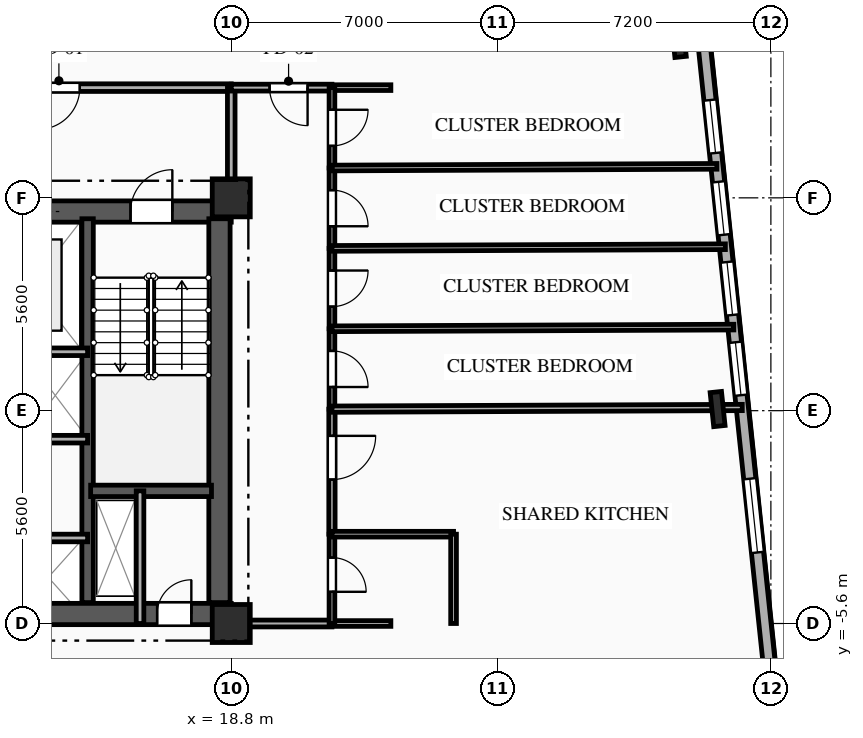
"""IFC4 building model, lengths in metres.
Left out: names, types, materials, properties, quantities, classifications, styles, units other than length and angle.
Written with IfcOpenShell. Run it as: python <this file> out.ifc"""

import sys

from ifc_helpers import new_model, si_unit, direction, frame, frame_2d, origin, origin_2d, place, context, subcontext, project, spatial, rectangle, i_section, extrude, element, fill, save


model = new_model("IFC4")
c1 = context("Model", 3, precision=1e-05, world=origin(), true_north=direction((0.0, 1.0)))
c2 = subcontext(c1, "Body", "Model", "MODEL_VIEW")
j1 = project(units=[si_unit("LENGTHUNIT", "METRE"), si_unit("PLANEANGLEUNIT", "RADIAN")], contexts=[c1])
p1 = place(None, origin())
s1 = spatial("IfcSite", under=j1, at=p1, CompositionType="ELEMENT")
p2 = place(p1, origin())
s2 = spatial("IfcBuilding", under=s1, at=p2, CompositionType="ELEMENT")
p3 = place(p2, frame((0.0, 0.0, 79.0)))
s3 = spatial("IfcBuildingStorey", under=s2, at=p3, CompositionType="ELEMENT", Elevation=79.0)
for number, where, z_axis, x_axis in (
    (1, (18.8, -5.6, 0.0), (0.0, 0.0, 1.0), (1.0, 0.0, 0.0)),
    (2, (18.8, 5.6, 0.0), (0.0, 0.0, 1.0), (1.0, 0.0, 0.0)),
):
    element("IfcColumn", number, at=place(p3, frame(where, z_axis=z_axis, x_axis=x_axis)), inside=s3, PredefinedType="COLUMN", context=c2, shape_type="SweptSolid", body=[
        extrude(rectangle(XDim=1.0, YDim=1.0, at=origin_2d()), origin(), (0.0, 0.0, 1.0), 3.35),
    ])
for number, where, z_axis, x_axis in (
    (3, (31.598, 0.043, 0.0), (0.0, 0.0, 1.0), (0.995, 0.105, 0.0)),
    (4, (30.577, 9.756, 0.0), (0.0, 0.0, 1.0), (0.995, 0.105, 0.0)),
):
    element("IfcColumn", number, at=place(p3, frame(where, z_axis=z_axis, x_axis=x_axis)), inside=s3, PredefinedType="COLUMN", context=c2, shape_type="SweptSolid", body=[
        extrude(i_section(OverallWidth=0.3, OverallDepth=0.9, WebThickness=0.019, FlangeThickness=0.035, FilletRadius=0.03, at=origin_2d()), origin(), (0.0, 0.0, 1.0), 3.35),
    ])
p4 = place(p3, frame((30.135, 20.183, 0.0), z_axis=(0.0, 0.0, 1.0), x_axis=(0.104525716865, -0.994522184023, 0.0)))
e5 = element("IfcWall", 5, at=p4, inside=s3, PredefinedType="SOLIDWALL", context=c2, shape_type="SweptSolid", body=[
    extrude(rectangle(XDim=30.6, YDim=0.32, at=frame_2d((15.3, 0.0))), origin(), (0.0, 0.0, 1.0), 3.045),
])
p5 = place(p4, frame((12.077, 0.0, 0.85)))
e6 = element("IfcOpeningElement", 6, at=p5, cuts=e5, PredefinedType="OPENING", context=c2, shape_type="SweptSolid", body=[
    extrude(rectangle(XDim=1.4, YDim=1.85, at=frame_2d((0.7, 0.925))), frame((0.0, 0.17, 0.0), z_axis=(0.0, -1.0, 0.0), x_axis=(1.0, 0.0, 0.0)), (0.0, 0.0, 1.0), 0.34),
])
p6 = place(p4, frame((14.24, 0.0, 0.85)))
e7 = element("IfcOpeningElement", 7, at=p6, cuts=e5, PredefinedType="OPENING", context=c2, shape_type="SweptSolid", body=[
    extrude(rectangle(XDim=1.4, YDim=1.85, at=frame_2d((0.7, 0.925))), frame((0.0, 0.17, 0.0), z_axis=(0.0, -1.0, 0.0), x_axis=(1.0, 0.0, 0.0)), (0.0, 0.0, 1.0), 0.34),
])
p7 = place(p4, frame((16.362, 0.0, 0.85)))
e8 = element("IfcOpeningElement", 8, at=p7, cuts=e5, PredefinedType="OPENING", context=c2, shape_type="SweptSolid", body=[
    extrude(rectangle(XDim=1.4, YDim=1.85, at=frame_2d((0.7, 0.925))), frame((0.0, 0.17, 0.0), z_axis=(0.0, -1.0, 0.0), x_axis=(1.0, 0.0, 0.0)), (0.0, 0.0, 1.0), 0.34),
])
p8 = place(p4, frame((18.485, 0.0, 0.85)))
e9 = element("IfcOpeningElement", 9, at=p8, cuts=e5, PredefinedType="OPENING", context=c2, shape_type="SweptSolid", body=[
    extrude(rectangle(XDim=1.4, YDim=1.85, at=frame_2d((0.7, 0.925))), frame((0.0, 0.17, 0.0), z_axis=(0.0, -1.0, 0.0), x_axis=(1.0, 0.0, 0.0)), (0.0, 0.0, 1.0), 0.34),
])
p9 = place(p4, frame((22.095, 0.0, 0.85)))
e10 = element("IfcOpeningElement", 10, at=p9, cuts=e5, PredefinedType="OPENING", context=c2, shape_type="SweptSolid", body=[
    extrude(rectangle(XDim=1.95, YDim=1.85, at=frame_2d((0.975, 0.925))), frame((0.0, 0.17, 0.0), z_axis=(0.0, -1.0, 0.0), x_axis=(1.0, 0.0, 0.0)), (0.0, 0.0, 1.0), 0.34),
])
p10 = place(p3, frame((9.2, 5.24, 0.0), z_axis=(0.0, 0.0, 1.0), x_axis=(1.0, 0.0, 0.0)))
e11 = element("IfcWall", 11, at=p10, inside=s3, PredefinedType="SHEAR", context=c2, shape_type="SweptSolid", body=[
    extrude(rectangle(XDim=9.6, YDim=0.56, at=frame_2d((4.8, 0.0))), origin(), (0.0, 0.0, 1.0), 3.045),
])
p11 = place(p10, frame((6.95, 0.0, 0.0)))
e12 = element("IfcOpeningElement", 12, at=p11, cuts=e11, PredefinedType="OPENING", context=c2, shape_type="SweptSolid", body=[
    extrude(rectangle(XDim=1.1, YDim=2.15, at=frame_2d((0.55, 1.075))), frame((0.0, 0.29, 0.0), z_axis=(0.0, -1.0, 0.0), x_axis=(1.0, 0.0, 0.0)), (0.0, 0.0, 1.0), 0.58),
])
p12 = place(p10, frame((3.775, 0.0, 0.0)))
e13 = element("IfcOpeningElement", 13, at=p12, cuts=e11, PredefinedType="OPENING", context=c2, shape_type="SweptSolid", body=[
    extrude(rectangle(XDim=1.05, YDim=2.1, at=frame_2d((0.525, 1.05))), frame((0.0, 0.29, 0.0), z_axis=(0.0, -1.0, 0.0), x_axis=(1.0, 0.0, 0.0)), (0.0, 0.0, 1.0), 0.58),
])
p13 = place(p3, frame((9.2, -5.35, 0.0), z_axis=(0.0, 0.0, 1.0), x_axis=(1.0, 0.0, 0.0)))
e14 = element("IfcWall", 14, at=p13, inside=s3, PredefinedType="SHEAR", context=c2, shape_type="SweptSolid", body=[
    extrude(rectangle(XDim=9.6, YDim=0.56, at=frame_2d((4.8, 0.0))), origin(), (0.0, 0.0, 1.0), 3.045),
])
p14 = place(p13, frame((7.65, 0.0, 0.0)))
e15 = element("IfcOpeningElement", 15, at=p14, cuts=e14, PredefinedType="OPENING", context=c2, shape_type="SweptSolid", body=[
    extrude(rectangle(XDim=0.9, YDim=2.1, at=frame_2d((0.45, 1.05))), frame((0.0, 0.29, 0.0), z_axis=(0.0, -1.0, 0.0), x_axis=(1.0, 0.0, 0.0)), (0.0, 0.0, 1.0), 0.58),
])
p15 = place(p3, frame((18.49, -5.05, 0.0), z_axis=(0.0, 0.0, 1.0), x_axis=(0.0, 1.0, 0.0)))
e16 = element("IfcWall", 16, at=p15, inside=s3, PredefinedType="SHEAR", context=c2, shape_type="SweptSolid", body=[
    extrude(rectangle(XDim=10.1, YDim=0.56, at=frame_2d((5.05, 0.0))), origin(), (0.0, 0.0, 1.0), 3.045),
])
p16 = place(p3, frame((15.02, -5.05, 0.0), z_axis=(0.0, 0.0, 1.0), x_axis=(0.0, 1.0, 0.0)))
e17 = element("IfcWall", 17, at=p16, inside=s3, PredefinedType="SHEAR", context=c2, shape_type="SweptSolid", body=[
    extrude(rectangle(XDim=10.1, YDim=0.3, at=frame_2d((5.05, 0.0))), origin(), (0.0, 0.0, 1.0), 3.045),
])
p17 = place(p3, frame((15.1, -2.11, 0.0), z_axis=(0.0, 0.0, 1.0), x_axis=(1.0, 0.0, 0.0)))
e18 = element("IfcWall", 18, at=p17, inside=s3, PredefinedType="SHEAR", context=c2, shape_type="SweptSolid", body=[
    extrude(rectangle(XDim=3.18, YDim=0.3, at=frame_2d((1.59, 0.0))), origin(), (0.0, 0.0, 1.0), 3.045),
])
p18 = place(p3, frame((16.4, -2.11, 0.0), z_axis=(0.0, 0.0, 1.0), x_axis=(0.0, -1.0, 0.0)))
e19 = element("IfcWall", 19, at=p18, inside=s3, PredefinedType="PARTITIONING", context=c2, shape_type="SweptSolid", body=[
    extrude(rectangle(XDim=3.49, YDim=0.2, at=frame_2d((1.745, 0.0))), origin(), (0.0, 0.0, 1.0), 3.045),
])
p19 = place(p3, frame((18.8, 8.5, 0.0), z_axis=(0.0, 0.0, 1.0), x_axis=(-1.0, 0.0, 0.0)))
e20 = element("IfcWall", 20, at=p19, inside=s3, PredefinedType="PARTITIONING", context=c2, shape_type="SweptSolid", body=[
    extrude(rectangle(XDim=6.8, YDim=0.2, at=frame_2d((3.4, 0.0))), origin(), (0.0, 0.0, 1.0), 3.045),
])
p20 = place(p19, frame((3.985, 0.0, 0.0)))
e21 = element("IfcOpeningElement", 21, at=p20, cuts=e20, PredefinedType="OPENING", context=c2, shape_type="SweptSolid", body=[
    extrude(rectangle(XDim=1.1, YDim=2.15, at=frame_2d((0.55, 1.075))), frame((0.0, 0.11, 0.0), z_axis=(0.0, -1.0, 0.0), x_axis=(1.0, 0.0, 0.0)), (0.0, 0.0, 1.0), 0.22),
])
p21 = place(p3, frame((18.8, 5.6, 0.0), z_axis=(0.0, 0.0, 1.0), x_axis=(0.0, 1.0, 0.0)))
e22 = element("IfcWall", 22, at=p21, inside=s3, PredefinedType="PARTITIONING", context=c2, shape_type="SweptSolid", body=[
    extrude(rectangle(XDim=2.9, YDim=0.2, at=frame_2d((1.45, 0.0))), origin(), (0.0, 0.0, 1.0), 2.53),
])
p22 = place(p3, frame((13.02, -3.35, 0.0), z_axis=(0.0, 0.0, 1.0), x_axis=(1.0, 0.0, 0.0)))
e23 = element("IfcWall", 23, at=p22, inside=s3, PredefinedType="PARTITIONING", context=c2, shape_type="SweptSolid", body=[
    extrude(rectangle(XDim=2.0, YDim=0.2, at=frame_2d((1.0, 0.0))), origin(), (0.0, 0.0, 1.0), 3.045),
])
p23 = place(p3, frame((15.02, -0.75, 0.0), z_axis=(0.0, 0.0, 1.0), x_axis=(-1.0, 0.0, 0.0)))
e24 = element("IfcWall", 24, at=p23, inside=s3, PredefinedType="PARTITIONING", context=c2, shape_type="SweptSolid", body=[
    extrude(rectangle(XDim=1.68, YDim=0.2, at=frame_2d((0.84, 0.0))), origin(), (0.0, 0.0, 1.0), 3.045),
])
p24 = place(p3, frame((21.45, 8.5, 0.0), z_axis=(0.0, 0.0, 1.0), x_axis=(-1.0, 0.0, 0.0)))
e25 = element("IfcWall", 25, at=p24, inside=s3, PredefinedType="PARTITIONING", context=c2, shape_type="SweptSolid", body=[
    extrude(rectangle(XDim=2.65, YDim=0.18, at=frame_2d((1.325, 0.0))), origin(), (0.0, 0.0, 1.0), 3.045),
])
p25 = place(p24, frame((0.641, 0.0, 0.0)))
e26 = element("IfcOpeningElement", 26, at=p25, cuts=e25, PredefinedType="OPENING", context=c2, shape_type="SweptSolid", body=[
    extrude(rectangle(XDim=1.0, YDim=2.15, at=frame_2d((0.5, 1.075))), frame((0.0, 0.1, 0.0), z_axis=(0.0, -1.0, 0.0), x_axis=(1.0, 0.0, 0.0)), (0.0, 0.0, 1.0), 0.2),
])
p26 = place(p3, frame((23.0, 8.5, 0.0), z_axis=(0.0, 0.0, 1.0), x_axis=(-1.0, 0.0, 0.0)))
e27 = element("IfcWall", 27, at=p26, inside=s3, PredefinedType="PARTITIONING", context=c2, shape_type="SweptSolid", body=[
    extrude(rectangle(XDim=1.55, YDim=0.15, at=frame_2d((0.775, 0.0))), origin(), (0.0, 0.0, 1.0), 3.045),
])
p27 = place(p3, frame((18.8, -5.6, 0.0), z_axis=(0.0, 0.0, 1.0), x_axis=(1.0, 0.0, 0.0)))
e28 = element("IfcWall", 28, at=p27, inside=s3, PredefinedType="PARTITIONING", context=c2, shape_type="SweptSolid", body=[
    extrude(rectangle(XDim=2.65, YDim=0.18, at=frame_2d((1.325, 0.0))), origin(), (0.0, 0.0, 1.0), 2.53),
])
p28 = place(p3, frame((21.45, -5.6, 0.0), z_axis=(0.0, 0.0, 1.0), x_axis=(1.0, 0.0, 0.0)))
e29 = element("IfcWall", 29, at=p28, inside=s3, PredefinedType="PLUMBINGWALL", context=c2, shape_type="SweptSolid", body=[
    extrude(rectangle(XDim=1.55, YDim=0.15, at=frame_2d((0.775, 0.0))), origin(), (0.0, 0.0, 1.0), 3.045),
])
p29 = place(p3, frame((21.45, -3.25, 0.0), z_axis=(0.0, 0.0, 1.0), x_axis=(0.0, -1.0, 0.0)))
e30 = element("IfcWall", 30, at=p29, inside=s3, PredefinedType="PLUMBINGWALL", context=c2, shape_type="SweptSolid", body=[
    extrude(rectangle(XDim=2.35, YDim=0.15, at=frame_2d((1.175, 0.0))), origin(), (0.0, 0.0, 1.0), 3.045),
])
p30 = place(p29, frame((0.616, 0.0, 0.0)))
e31 = element("IfcOpeningElement", 31, at=p30, cuts=e30, PredefinedType="OPENING", context=c2, shape_type="SweptSolid", body=[
    extrude(rectangle(XDim=0.9, YDim=2.1, at=frame_2d((0.45, 1.05))), frame((0.0, 0.085, 0.0), z_axis=(0.0, -1.0, 0.0), x_axis=(1.0, 0.0, 0.0)), (0.0, 0.0, 1.0), 0.17),
])
p31 = place(p3, frame((21.45, 0.04, 0.0), z_axis=(0.0, 0.0, 1.0), x_axis=(0.0, -1.0, 0.0)))
e32 = element("IfcWall", 32, at=p31, inside=s3, PredefinedType="PARTITIONING", context=c2, shape_type="SweptSolid", body=[
    extrude(rectangle(XDim=3.29, YDim=0.165, at=frame_2d((1.645, 0.0))), origin(), (0.0, 0.0, 1.0), 3.045),
])
p32 = place(p31, frame((0.702, 0.0, 0.0)))
e33 = element("IfcOpeningElement", 33, at=p32, cuts=e32, PredefinedType="OPENING", context=c2, shape_type="SweptSolid", body=[
    extrude(rectangle(XDim=1.15, YDim=2.15, at=frame_2d((0.575, 1.075))), frame((0.0, 0.093, 0.0), z_axis=(0.0, -1.0, 0.0), x_axis=(1.0, 0.0, 0.0)), (0.0, 0.0, 1.0), 0.185),
])
p33 = place(p3, frame((21.45, 2.155, 0.0), z_axis=(0.0, 0.0, 1.0), x_axis=(0.0, -1.0, 0.0)))
e34 = element("IfcWall", 34, at=p33, inside=s3, PredefinedType="PARTITIONING", context=c2, shape_type="SweptSolid", body=[
    extrude(rectangle(XDim=2.115, YDim=0.15, at=frame_2d((1.058, 0.0))), origin(), (0.0, 0.0, 1.0), 3.045),
])
p34 = place(p33, frame((0.583, 0.0, 0.0)))
e35 = element("IfcOpeningElement", 35, at=p34, cuts=e34, PredefinedType="OPENING", context=c2, shape_type="SweptSolid", body=[
    extrude(rectangle(XDim=0.95, YDim=2.1, at=frame_2d((0.475, 1.05))), frame((0.0, 0.085, 0.0), z_axis=(0.0, -1.0, 0.0), x_axis=(1.0, 0.0, 0.0)), (0.0, 0.0, 1.0), 0.17),
])
p35 = place(p3, frame((21.45, 4.27, 0.0), z_axis=(0.0, 0.0, 1.0), x_axis=(0.0, -1.0, 0.0)))
e36 = element("IfcWall", 36, at=p35, inside=s3, PredefinedType="PARTITIONING", context=c2, shape_type="SweptSolid", body=[
    extrude(rectangle(XDim=2.115, YDim=0.15, at=frame_2d((1.058, 0.0))), origin(), (0.0, 0.0, 1.0), 3.045),
])
p36 = place(p35, frame((0.583, 0.0, 0.0)))
e37 = element("IfcOpeningElement", 37, at=p36, cuts=e36, PredefinedType="OPENING", context=c2, shape_type="SweptSolid", body=[
    extrude(rectangle(XDim=0.95, YDim=2.1, at=frame_2d((0.475, 1.05))), frame((0.0, 0.085, 0.0), z_axis=(0.0, -1.0, 0.0), x_axis=(1.0, 0.0, 0.0)), (0.0, 0.0, 1.0), 0.17),
])
p37 = place(p3, frame((21.45, 6.385, 0.0), z_axis=(0.0, 0.0, 1.0), x_axis=(0.0, -1.0, 0.0)))
e38 = element("IfcWall", 38, at=p37, inside=s3, PredefinedType="PARTITIONING", context=c2, shape_type="SweptSolid", body=[
    extrude(rectangle(XDim=2.115, YDim=0.15, at=frame_2d((1.058, 0.0))), origin(), (0.0, 0.0, 1.0), 3.045),
])
p38 = place(p37, frame((0.583, 0.0, 0.0)))
e39 = element("IfcOpeningElement", 39, at=p38, cuts=e38, PredefinedType="OPENING", context=c2, shape_type="SweptSolid", body=[
    extrude(rectangle(XDim=0.95, YDim=2.1, at=frame_2d((0.475, 1.05))), frame((0.0, 0.085, 0.0), z_axis=(0.0, -1.0, 0.0), x_axis=(1.0, 0.0, 0.0)), (0.0, 0.0, 1.0), 0.17),
])
p39 = place(p3, frame((21.45, 8.5, 0.0), z_axis=(0.0, 0.0, 1.0), x_axis=(0.0, -1.0, 0.0)))
e40 = element("IfcWall", 40, at=p39, inside=s3, PredefinedType="PARTITIONING", context=c2, shape_type="SweptSolid", body=[
    extrude(rectangle(XDim=2.115, YDim=0.15, at=frame_2d((1.058, 0.0))), origin(), (0.0, 0.0, 1.0), 3.045),
])
p40 = place(p39, frame((0.583, 0.0, 0.0)))
e41 = element("IfcOpeningElement", 41, at=p40, cuts=e40, PredefinedType="OPENING", context=c2, shape_type="SweptSolid", body=[
    extrude(rectangle(XDim=0.95, YDim=2.1, at=frame_2d((0.475, 1.05))), frame((0.0, 0.085, 0.0), z_axis=(0.0, -1.0, 0.0), x_axis=(1.0, 0.0, 0.0)), (0.0, 0.0, 1.0), 0.17),
])
p41 = place(p3, frame((21.45, -3.25, 0.0), z_axis=(0.0, 0.0, 1.0), x_axis=(1.0, 0.0, 0.0)))
e42 = element("IfcWall", 42, at=p41, inside=s3, PredefinedType="PLUMBINGWALL", context=c2, shape_type="SweptSolid", body=[
    extrude(rectangle(XDim=3.2, YDim=0.15, at=frame_2d((1.6, 0.0))), origin(), (0.0, 0.0, 1.0), 3.045),
])
p42 = place(p3, frame((24.65, -3.25, 0.0), z_axis=(0.0, 0.0, 1.0), x_axis=(0.0, -1.0, 0.0)))
e43 = element("IfcWall", 43, at=p42, inside=s3, PredefinedType="PLUMBINGWALL", context=c2, shape_type="SweptSolid", body=[
    extrude(rectangle(XDim=2.35, YDim=0.15, at=frame_2d((1.175, 0.0))), origin(), (0.0, 0.0, 1.0), 3.045),
])
p43 = place(p3, frame((21.45, 0.04, 0.0), z_axis=(0.0, 0.0, 1.0), x_axis=(0.999991717636, 0.004069970361, 0.0)))
e44 = element("IfcWall", 44, at=p43, inside=s3, PredefinedType="PARTITIONING", context=c2, shape_type="SweptSolid", body=[
    extrude(rectangle(XDim=10.797, YDim=0.165, at=frame_2d((5.399, 0.0))), origin(), (0.0, 0.0, 1.0), 2.53),
])
p44 = place(p3, frame((21.45, 2.155, 0.0), z_axis=(0.0, 0.0, 1.0), x_axis=(0.999991365588, 0.004155568413, 0.0)))
e45 = element("IfcWall", 45, at=p44, inside=s3, PredefinedType="PARTITIONING", context=c2, shape_type="SweptSolid", body=[
    extrude(rectangle(XDim=10.575, YDim=0.15, at=frame_2d((5.288, 0.0))), origin(), (0.0, 0.0, 1.0), 3.045),
])
p45 = place(p3, frame((21.45, 4.27, 0.0), z_axis=(0.0, 0.0, 1.0), x_axis=(0.999990991033, 0.004244744214, 0.0)))
e46 = element("IfcWall", 46, at=p45, inside=s3, PredefinedType="PARTITIONING", context=c2, shape_type="SweptSolid", body=[
    extrude(rectangle(XDim=10.353, YDim=0.15, at=frame_2d((5.176, 0.0))), origin(), (0.0, 0.0, 1.0), 3.045),
])
p46 = place(p3, frame((21.45, 6.385, 0.0), z_axis=(0.0, 0.0, 1.0), x_axis=(0.999990591112, 0.004337935759, 0.0)))
e47 = element("IfcWall", 47, at=p46, inside=s3, PredefinedType="PARTITIONING", context=c2, shape_type="SweptSolid", body=[
    extrude(rectangle(XDim=10.13, YDim=0.15, at=frame_2d((5.065, 0.0))), origin(), (0.0, 0.0, 1.0), 3.045),
])
p47 = place(p3, frame((9.2, 1.55, 0.0), z_axis=(0.0, 0.0, 1.0), x_axis=(1.0, 0.0, 0.0)))
e48 = element("IfcWall", 48, at=p47, inside=s3, PredefinedType="PARTITIONING", context=c2, shape_type="SweptSolid", body=[
    extrude(rectangle(XDim=5.82, YDim=0.2, at=frame_2d((2.91, 0.0))), origin(), (0.0, 0.0, 1.0), 3.045),
])
p48 = place(p5, origin())
e49 = element("IfcWindow", 49, at=p48, inside=s3, PartitioningType="SINGLE_PANEL", PredefinedType="WINDOW", context=c2, shape_type="SweptSolid", body=[
    extrude(rectangle(XDim=1.4, YDim=1.85, at=frame_2d((0.7, 0.925))), frame((0.0, 0.03, 0.0), z_axis=(0.0, -1.0, 0.0), x_axis=(1.0, 0.0, 0.0)), (0.0, 0.0, 1.0), 0.06),
])
fill(e6, e49)
p49 = place(p6, origin())
e50 = element("IfcWindow", 50, at=p49, inside=s3, PartitioningType="SINGLE_PANEL", PredefinedType="WINDOW", context=c2, shape_type="SweptSolid", body=[
    extrude(rectangle(XDim=1.4, YDim=1.85, at=frame_2d((0.7, 0.925))), frame((0.0, 0.03, 0.0), z_axis=(0.0, -1.0, 0.0), x_axis=(1.0, 0.0, 0.0)), (0.0, 0.0, 1.0), 0.06),
])
fill(e7, e50)
p50 = place(p7, origin())
e51 = element("IfcWindow", 51, at=p50, inside=s3, PartitioningType="SINGLE_PANEL", PredefinedType="WINDOW", context=c2, shape_type="SweptSolid", body=[
    extrude(rectangle(XDim=1.4, YDim=1.85, at=frame_2d((0.7, 0.925))), frame((0.0, 0.03, 0.0), z_axis=(0.0, -1.0, 0.0), x_axis=(1.0, 0.0, 0.0)), (0.0, 0.0, 1.0), 0.06),
])
fill(e8, e51)
p51 = place(p8, origin())
e52 = element("IfcWindow", 52, at=p51, inside=s3, PartitioningType="SINGLE_PANEL", PredefinedType="WINDOW", context=c2, shape_type="SweptSolid", body=[
    extrude(rectangle(XDim=1.4, YDim=1.85, at=frame_2d((0.7, 0.925))), frame((0.0, 0.03, 0.0), z_axis=(0.0, -1.0, 0.0), x_axis=(1.0, 0.0, 0.0)), (0.0, 0.0, 1.0), 0.06),
])
fill(e9, e52)
p52 = place(p9, origin())
e53 = element("IfcWindow", 53, at=p52, inside=s3, PartitioningType="SINGLE_PANEL", PredefinedType="WINDOW", context=c2, shape_type="SweptSolid", body=[
    extrude(rectangle(XDim=1.95, YDim=1.85, at=frame_2d((0.975, 0.925))), frame((0.0, 0.03, 0.0), z_axis=(0.0, -1.0, 0.0), x_axis=(1.0, 0.0, 0.0)), (0.0, 0.0, 1.0), 0.06),
])
fill(e10, e53)
p53 = place(p11, origin())
e54 = element("IfcDoor", 54, at=p53, inside=s3, OperationType="SINGLE_SWING_RIGHT", PredefinedType="DOOR", context=c2, shape_type="SweptSolid", body=[
    extrude(rectangle(XDim=1.1, YDim=2.15, at=frame_2d((0.55, 1.075))), frame((0.0, 0.025, 0.0), z_axis=(0.0, -1.0, 0.0), x_axis=(1.0, 0.0, 0.0)), (0.0, 0.0, 1.0), 0.05),
])
fill(e12, e54)
p54 = place(p14, origin())
e55 = element("IfcDoor", 55, at=p54, inside=s3, OperationType="SINGLE_SWING_RIGHT", PredefinedType="DOOR", context=c2, shape_type="SweptSolid", body=[
    extrude(rectangle(XDim=0.9, YDim=2.1, at=frame_2d((0.45, 1.05))), frame((0.0, 0.025, 0.0), z_axis=(0.0, -1.0, 0.0), x_axis=(1.0, 0.0, 0.0)), (0.0, 0.0, 1.0), 0.05),
])
fill(e15, e55)
p55 = place(p20, origin())
e56 = element("IfcDoor", 56, at=p55, inside=s3, OperationType="SINGLE_SWING_RIGHT", PredefinedType="DOOR", context=c2, shape_type="SweptSolid", body=[
    extrude(rectangle(XDim=1.1, YDim=2.15, at=frame_2d((0.55, 1.075))), frame((0.0, 0.025, 0.0), z_axis=(0.0, -1.0, 0.0), x_axis=(1.0, 0.0, 0.0)), (0.0, 0.0, 1.0), 0.05),
])
fill(e21, e56)
p56 = place(p25, origin())
e57 = element("IfcDoor", 57, at=p56, inside=s3, OperationType="SINGLE_SWING_LEFT", PredefinedType="DOOR", context=c2, shape_type="SweptSolid", body=[
    extrude(rectangle(XDim=1.0, YDim=2.15, at=frame_2d((0.5, 1.075))), frame((0.0, 0.025, 0.0), z_axis=(0.0, -1.0, 0.0), x_axis=(1.0, 0.0, 0.0)), (0.0, 0.0, 1.0), 0.05),
])
fill(e26, e57)
p57 = place(p30, origin())
e58 = element("IfcDoor", 58, at=p57, inside=s3, OperationType="SINGLE_SWING_RIGHT", PredefinedType="DOOR", context=c2, shape_type="SweptSolid", body=[
    extrude(rectangle(XDim=0.9, YDim=2.1, at=frame_2d((0.45, 1.05))), frame((0.0, 0.025, 0.0), z_axis=(0.0, -1.0, 0.0), x_axis=(1.0, 0.0, 0.0)), (0.0, 0.0, 1.0), 0.05),
])
fill(e31, e58)
p58 = place(p32, origin())
e59 = element("IfcDoor", 59, at=p58, inside=s3, OperationType="SINGLE_SWING_LEFT", PredefinedType="DOOR", context=c2, shape_type="SweptSolid", body=[
    extrude(rectangle(XDim=1.15, YDim=2.15, at=frame_2d((0.575, 1.075))), frame((0.0, 0.025, 0.0), z_axis=(0.0, -1.0, 0.0), x_axis=(1.0, 0.0, 0.0)), (0.0, 0.0, 1.0), 0.05),
])
fill(e33, e59)
p59 = place(p34, origin())
e60 = element("IfcDoor", 60, at=p59, inside=s3, OperationType="SINGLE_SWING_RIGHT", PredefinedType="DOOR", context=c2, shape_type="SweptSolid", body=[
    extrude(rectangle(XDim=0.95, YDim=2.1, at=frame_2d((0.475, 1.05))), frame((0.0, 0.025, 0.0), z_axis=(0.0, -1.0, 0.0), x_axis=(1.0, 0.0, 0.0)), (0.0, 0.0, 1.0), 0.05),
])
fill(e35, e60)
p60 = place(p36, origin())
e61 = element("IfcDoor", 61, at=p60, inside=s3, OperationType="SINGLE_SWING_LEFT", PredefinedType="DOOR", context=c2, shape_type="SweptSolid", body=[
    extrude(rectangle(XDim=0.95, YDim=2.1, at=frame_2d((0.475, 1.05))), frame((0.0, 0.025, 0.0), z_axis=(0.0, -1.0, 0.0), x_axis=(1.0, 0.0, 0.0)), (0.0, 0.0, 1.0), 0.05),
])
fill(e37, e61)
p61 = place(p38, origin())
e62 = element("IfcDoor", 62, at=p61, inside=s3, OperationType="SINGLE_SWING_RIGHT", PredefinedType="DOOR", context=c2, shape_type="SweptSolid", body=[
    extrude(rectangle(XDim=0.95, YDim=2.1, at=frame_2d((0.475, 1.05))), frame((0.0, 0.025, 0.0), z_axis=(0.0, -1.0, 0.0), x_axis=(1.0, 0.0, 0.0)), (0.0, 0.0, 1.0), 0.05),
])
fill(e39, e62)
p62 = place(p40, origin())
e63 = element("IfcDoor", 63, at=p62, inside=s3, OperationType="SINGLE_SWING_LEFT", PredefinedType="DOOR", context=c2, shape_type="SweptSolid", body=[
    extrude(rectangle(XDim=0.95, YDim=2.1, at=frame_2d((0.475, 1.05))), frame((0.0, 0.025, 0.0), z_axis=(0.0, -1.0, 0.0), x_axis=(1.0, 0.0, 0.0)), (0.0, 0.0, 1.0), 0.05),
])
fill(e41, e63)
save(model, sys.argv[1])
